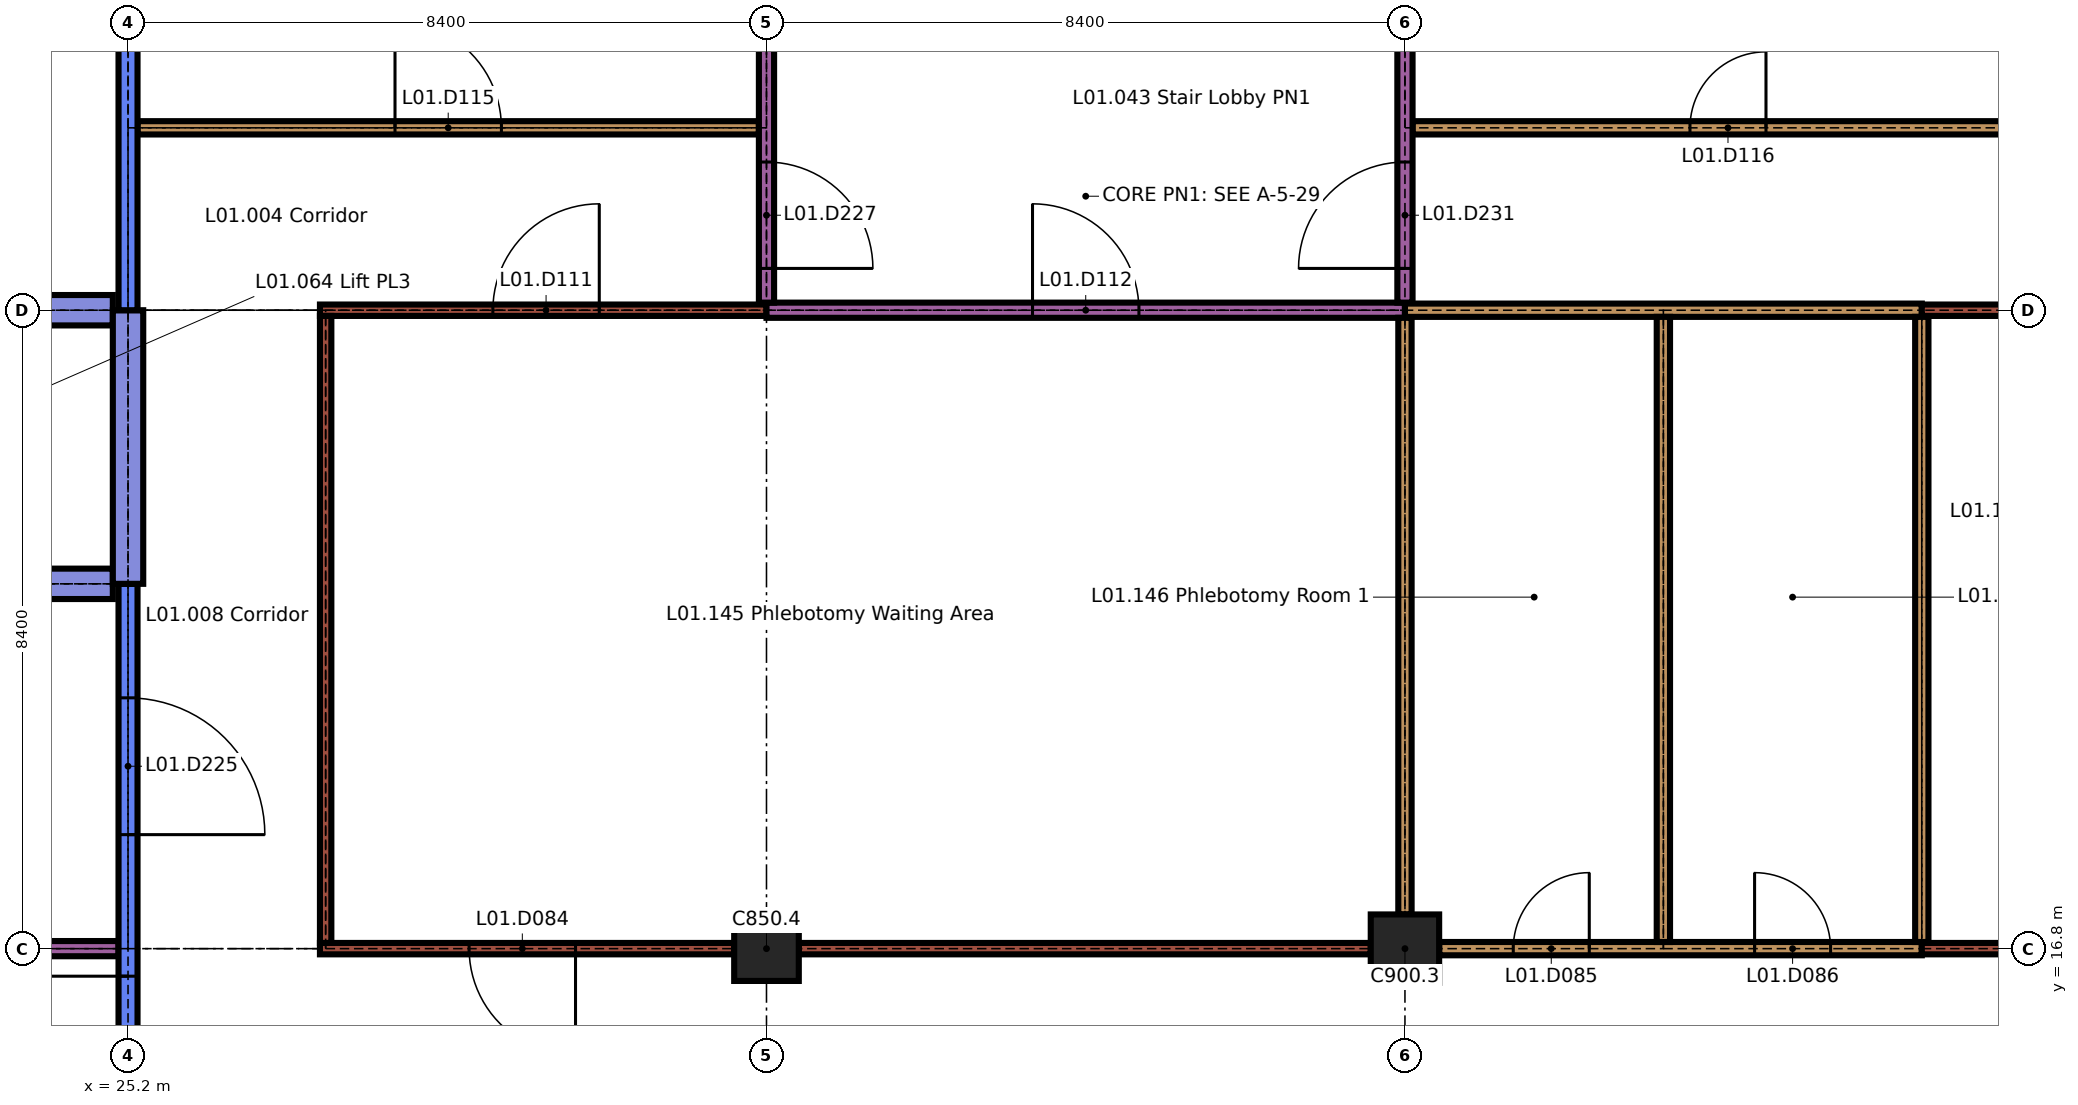
"""IFC4 building model, lengths in metres.
Left out: names, types, materials, properties, quantities, classifications, styles, units other than length and angle.
Written with IfcOpenShell. Run it as: python <this file> out.ifc"""

import sys

from ifc_helpers import new_model, si_unit, direction, frame, frame_2d, origin, origin_2d, place, context, subcontext, project, spatial, rectangle, extrude, element, fill, save


model = new_model("IFC4")
c1 = context("Model", 3, precision=1e-05, world=origin(), true_north=direction((0.0, 1.0)))
c2 = subcontext(c1, "Body", "Model", "MODEL_VIEW")
j1 = project(units=[si_unit("LENGTHUNIT", "METRE"), si_unit("PLANEANGLEUNIT", "RADIAN")], contexts=[c1])
p1 = place(None, origin())
s1 = spatial("IfcSite", under=j1, at=p1, CompositionType="ELEMENT")
p2 = place(p1, origin())
s2 = spatial("IfcBuilding", under=s1, at=p2, CompositionType="ELEMENT")
p3 = place(p2, frame((0.0, 0.0, 4.5)))
s3 = spatial("IfcBuildingStorey", under=s2, at=p3, CompositionType="ELEMENT", Elevation=4.5)
p4 = place(p3, frame((33.6, 16.8, 0.0), z_axis=(0.0, 0.0, 1.0), x_axis=(1.0, 0.0, 0.0)))
e1 = element("IfcColumn", 1, at=p4, inside=s3, PredefinedType="COLUMN", context=c2, shape_type="SweptSolid", body=[
    extrude(rectangle(XDim=0.85, YDim=0.85, at=origin_2d()), origin(), (0.0, 0.0, 1.0), 3.45),
])
p5 = place(p3, frame((42.0, 16.8, 0.0), z_axis=(0.0, 0.0, 1.0), x_axis=(1.0, 0.0, 0.0)))
e2 = element("IfcColumn", 2, at=p5, inside=s3, PredefinedType="COLUMN", context=c2, shape_type="SweptSolid", body=[
    extrude(rectangle(XDim=0.9, YDim=0.9, at=origin_2d()), origin(), (0.0, 0.0, 1.0), 3.45),
])
p6 = place(p3, frame((16.7, 16.8, 0.0), z_axis=(0.0, 0.0, 1.0), x_axis=(1.0, 0.0, 0.0)))
e3 = element("IfcWall", 3, at=p6, inside=s3, PredefinedType="PARTITIONING", context=c2, shape_type="SweptSolid", body=[
    extrude(rectangle(XDim=8.375, YDim=0.2, at=frame_2d((4.188, 0.0))), origin(), (0.0, 0.0, 1.0), 3.45),
])
p7 = place(p6, frame((3.337, 0.0, 0.0)))
e4 = element("IfcOpeningElement", 4, at=p7, cuts=e3, PredefinedType="OPENING", context=c2, shape_type="SweptSolid", body=[
    extrude(rectangle(XDim=1.8, YDim=2.4, at=frame_2d((0.9, 1.2))), frame((0.0, 0.11, 0.0), z_axis=(0.0, -1.0, 0.0), x_axis=(1.0, 0.0, 0.0)), (0.0, 0.0, 1.0), 0.22),
])
p8 = place(p3, frame((27.725, 16.8, 0.0), z_axis=(0.0, 0.0, 1.0), x_axis=(1.0, 0.0, 0.0)))
e5 = element("IfcWall", 5, at=p8, inside=s3, PredefinedType="PARTITIONING", context=c2, shape_type="SweptSolid", body=[
    extrude(rectangle(XDim=5.45, YDim=0.15, at=frame_2d((2.725, 0.0))), origin(), (0.0, 0.0, 1.0), 3.45),
])
p9 = place(p8, frame((1.962, 0.0, 0.0)))
e6 = element("IfcOpeningElement", 6, at=p9, cuts=e5, PredefinedType="OPENING", context=c2, shape_type="SweptSolid", body=[
    extrude(rectangle(XDim=1.4, YDim=2.1, at=frame_2d((0.7, 1.05))), frame((0.0, 0.085, 0.0), z_axis=(0.0, -1.0, 0.0), x_axis=(1.0, 0.0, 0.0)), (0.0, 0.0, 1.0), 0.17),
])
p10 = place(p3, frame((34.025, 16.8, 0.0), z_axis=(0.0, 0.0, 1.0), x_axis=(1.0, 0.0, 0.0)))
e7 = element("IfcWall", 7, at=p10, inside=s3, PredefinedType="PARTITIONING", context=c2, shape_type="SweptSolid", body=[
    extrude(rectangle(XDim=7.525, YDim=0.15, at=frame_2d((3.763, 0.0))), origin(), (0.0, 0.0, 1.0), 3.45),
])
p11 = place(p3, frame((42.45, 16.8, 0.0), z_axis=(0.0, 0.0, 1.0), x_axis=(1.0, 0.0, 0.0)))
e8 = element("IfcWall", 8, at=p11, inside=s3, PredefinedType="PARTITIONING", context=c2, shape_type="SweptSolid", body=[
    extrude(rectangle(XDim=6.35, YDim=0.175, at=frame_2d((3.175, 0.0))), origin(), (0.0, 0.0, 1.0), 3.45),
])
p12 = place(p11, frame((0.975, 0.0, 0.0)))
e9 = element("IfcOpeningElement", 9, at=p12, cuts=e8, PredefinedType="OPENING", context=c2, shape_type="SweptSolid", body=[
    extrude(rectangle(XDim=1.0, YDim=2.1, at=frame_2d((0.5, 1.05))), frame((0.0, 0.097, 0.0), z_axis=(0.0, -1.0, 0.0), x_axis=(1.0, 0.0, 0.0)), (0.0, 0.0, 1.0), 0.195),
])
p13 = place(p11, frame((4.15, 0.0, 0.0)))
e10 = element("IfcOpeningElement", 10, at=p13, cuts=e8, PredefinedType="OPENING", context=c2, shape_type="SweptSolid", body=[
    extrude(rectangle(XDim=1.0, YDim=2.1, at=frame_2d((0.5, 1.05))), frame((0.0, 0.097, 0.0), z_axis=(0.0, -1.0, 0.0), x_axis=(1.0, 0.0, 0.0)), (0.0, 0.0, 1.0), 0.195),
])
p14 = place(p3, frame((48.8, 16.8, 0.0), z_axis=(0.0, 0.0, 1.0), x_axis=(1.0, 0.0, 0.0)))
e11 = element("IfcWall", 11, at=p14, inside=s3, PredefinedType="PARTITIONING", context=c2, shape_type="SweptSolid", body=[
    extrude(rectangle(XDim=1.15, YDim=0.15, at=frame_2d((0.575, 0.0))), origin(), (0.0, 0.0, 1.0), 3.45),
])
p15 = place(p3, frame((17.0, 21.6, 0.0), z_axis=(0.0, 0.0, 1.0), x_axis=(1.0, 0.0, 0.0)))
e12 = element("IfcWall", 12, at=p15, inside=s3, PredefinedType="SHEAR", context=c2, shape_type="SweptSolid", body=[
    extrude(rectangle(XDim=8.0, YDim=0.4, at=frame_2d((4.0, 0.0))), origin(), (0.0, 0.0, 1.0), 3.45),
])
p16 = place(p15, frame((1.3, 0.0, 0.0)))
e13 = element("IfcOpeningElement", 13, at=p16, cuts=e12, PredefinedType="OPENING", context=c2, shape_type="SweptSolid", body=[
    extrude(rectangle(XDim=1.4, YDim=2.1, at=frame_2d((0.7, 1.05))), frame((0.0, 0.21, 0.0), z_axis=(0.0, -1.0, 0.0), x_axis=(1.0, 0.0, 0.0)), (0.0, 0.0, 1.0), 0.42),
])
p17 = place(p15, frame((5.45, 0.0, 0.0)))
e14 = element("IfcOpeningElement", 14, at=p17, cuts=e12, PredefinedType="OPENING", context=c2, shape_type="SweptSolid", body=[
    extrude(rectangle(XDim=1.1, YDim=2.1, at=frame_2d((0.55, 1.05))), frame((0.0, 0.21, 0.0), z_axis=(0.0, -1.0, 0.0), x_axis=(1.0, 0.0, 0.0)), (0.0, 0.0, 1.0), 0.42),
])
p18 = place(p3, frame((17.0, 25.2, 0.0), z_axis=(0.0, 0.0, 1.0), x_axis=(1.0, 0.0, 0.0)))
e15 = element("IfcWall", 15, at=p18, inside=s3, PredefinedType="SHEAR", context=c2, shape_type="SweptSolid", body=[
    extrude(rectangle(XDim=8.0, YDim=0.4, at=frame_2d((4.0, 0.0))), origin(), (0.0, 0.0, 1.0), 3.45),
])
p19 = place(p3, frame((27.725, 25.2, 0.0), z_axis=(0.0, 0.0, 1.0), x_axis=(1.0, 0.0, 0.0)))
e16 = element("IfcWall", 16, at=p19, inside=s3, PredefinedType="PARTITIONING", context=c2, shape_type="SweptSolid", body=[
    extrude(rectangle(XDim=5.875, YDim=0.15, at=frame_2d((2.938, 0.0))), origin(), (0.0, 0.0, 1.0), 3.45),
])
p20 = place(p19, frame((2.275, 0.0, 0.0)))
e17 = element("IfcOpeningElement", 17, at=p20, cuts=e16, PredefinedType="OPENING", context=c2, shape_type="SweptSolid", body=[
    extrude(rectangle(XDim=1.4, YDim=2.1, at=frame_2d((0.7, 1.05))), frame((0.0, 0.085, 0.0), z_axis=(0.0, -1.0, 0.0), x_axis=(1.0, 0.0, 0.0)), (0.0, 0.0, 1.0), 0.17),
])
p21 = place(p3, frame((33.6, 25.2, 0.0), z_axis=(0.0, 0.0, 1.0), x_axis=(1.0, 0.0, 0.0)))
e18 = element("IfcWall", 18, at=p21, inside=s3, PredefinedType="PARTITIONING", context=c2, shape_type="SweptSolid", body=[
    extrude(rectangle(XDim=8.4, YDim=0.2, at=frame_2d((4.2, 0.0))), origin(), (0.0, 0.0, 1.0), 3.45),
])
p22 = place(p21, frame((3.5, 0.0, 0.0)))
e19 = element("IfcOpeningElement", 19, at=p22, cuts=e18, PredefinedType="OPENING", context=c2, shape_type="SweptSolid", body=[
    extrude(rectangle(XDim=1.4, YDim=2.1, at=frame_2d((0.7, 1.05))), frame((0.0, 0.11, 0.0), z_axis=(0.0, -1.0, 0.0), x_axis=(1.0, 0.0, 0.0)), (0.0, 0.0, 1.0), 0.22),
])
p23 = place(p3, frame((42.0, 25.2, 0.0), z_axis=(0.0, 0.0, 1.0), x_axis=(1.0, 0.0, 0.0)))
e20 = element("IfcWall", 20, at=p23, inside=s3, PredefinedType="PARTITIONING", context=c2, shape_type="SweptSolid", body=[
    extrude(rectangle(XDim=6.8, YDim=0.175, at=frame_2d((3.4, 0.0))), origin(), (0.0, 0.0, 1.0), 3.45),
])
p24 = place(p3, frame((48.8, 25.2, 0.0), z_axis=(0.0, 0.0, 1.0), x_axis=(1.0, 0.0, 0.0)))
e21 = element("IfcWall", 21, at=p24, inside=s3, PredefinedType="PARTITIONING", context=c2, shape_type="SweptSolid", body=[
    extrude(rectangle(XDim=1.15, YDim=0.15, at=frame_2d((0.575, 0.0))), origin(), (0.0, 0.0, 1.0), 3.45),
])
p25 = place(p3, frame((25.325, 27.6, 0.0), z_axis=(0.0, 0.0, 1.0), x_axis=(1.0, 0.0, 0.0)))
e22 = element("IfcWall", 22, at=p25, inside=s3, PredefinedType="PARTITIONING", context=c2, shape_type="SweptSolid", body=[
    extrude(rectangle(XDim=8.175, YDim=0.175, at=frame_2d((4.087, 0.0))), origin(), (0.0, 0.0, 1.0), 3.45),
])
p26 = place(p25, frame((3.387, 0.0, 0.0)))
e23 = element("IfcOpeningElement", 23, at=p26, cuts=e22, PredefinedType="OPENING", context=c2, shape_type="SweptSolid", body=[
    extrude(rectangle(XDim=1.4, YDim=2.1, at=frame_2d((0.7, 1.05))), frame((0.0, 0.097, 0.0), z_axis=(0.0, -1.0, 0.0), x_axis=(1.0, 0.0, 0.0)), (0.0, 0.0, 1.0), 0.195),
])
p27 = place(p3, frame((42.1, 27.6, 0.0), z_axis=(0.0, 0.0, 1.0), x_axis=(1.0, 0.0, 0.0)))
e24 = element("IfcWall", 24, at=p27, inside=s3, PredefinedType="PARTITIONING", context=c2, shape_type="SweptSolid", body=[
    extrude(rectangle(XDim=8.3, YDim=0.175, at=frame_2d((4.15, 0.0))), origin(), (0.0, 0.0, 1.0), 3.45),
])
p28 = place(p27, frame((3.65, 0.0, 0.0)))
e25 = element("IfcOpeningElement", 25, at=p28, cuts=e24, PredefinedType="OPENING", context=c2, shape_type="SweptSolid", body=[
    extrude(rectangle(XDim=1.0, YDim=2.1, at=frame_2d((0.5, 1.05))), frame((0.0, 0.097, 0.0), z_axis=(0.0, -1.0, 0.0), x_axis=(1.0, 0.0, 0.0)), (0.0, 0.0, 1.0), 0.195),
])
p29 = place(p3, frame((25.2, 14.275, 0.0), z_axis=(0.0, 0.0, 1.0), x_axis=(0.0, 1.0, 0.0)))
e26 = element("IfcWall", 26, at=p29, inside=s3, PredefinedType="SOLIDWALL", context=c2, shape_type="SweptSolid", body=[
    extrude(rectangle(XDim=7.325, YDim=0.25, at=frame_2d((3.663, 0.0))), origin(), (0.0, 0.0, 1.0), 3.45),
])
p30 = place(p29, frame((0.363, 0.0, 0.0)))
e27 = element("IfcOpeningElement", 27, at=p30, cuts=e26, PredefinedType="OPENING", context=c2, shape_type="SweptSolid", body=[
    extrude(rectangle(XDim=1.8, YDim=2.4, at=frame_2d((0.9, 1.2))), frame((0.0, 0.135, 0.0), z_axis=(0.0, -1.0, 0.0), x_axis=(1.0, 0.0, 0.0)), (0.0, 0.0, 1.0), 0.27),
])
p31 = place(p29, frame((4.025, 0.0, 0.0)))
e28 = element("IfcOpeningElement", 28, at=p31, cuts=e26, PredefinedType="OPENING", context=c2, shape_type="SweptSolid", body=[
    extrude(rectangle(XDim=1.8, YDim=2.4, at=frame_2d((0.9, 1.2))), frame((0.0, 0.135, 0.0), z_axis=(0.0, -1.0, 0.0), x_axis=(1.0, 0.0, 0.0)), (0.0, 0.0, 1.0), 0.27),
])
p32 = place(p3, frame((25.2, 21.6, 0.0), z_axis=(0.0, 0.0, 1.0), x_axis=(0.0, 1.0, 0.0)))
e29 = element("IfcWall", 29, at=p32, inside=s3, PredefinedType="SHEAR", context=c2, shape_type="SweptSolid", body=[
    extrude(rectangle(XDim=3.6, YDim=0.4, at=frame_2d((1.8, 0.0))), origin(), (0.0, 0.0, 1.0), 3.45),
])
p33 = place(p3, frame((25.2, 25.2, 0.0), z_axis=(0.0, 0.0, 1.0), x_axis=(0.0, 1.0, 0.0)))
e30 = element("IfcWall", 30, at=p33, inside=s3, PredefinedType="SOLIDWALL", context=c2, shape_type="SweptSolid", body=[
    extrude(rectangle(XDim=7.975, YDim=0.25, at=frame_2d((3.988, 0.0))), origin(), (0.0, 0.0, 1.0), 3.45),
])
p34 = place(p3, frame((27.8, 16.875, 0.0), z_axis=(0.0, 0.0, 1.0), x_axis=(0.0, 1.0, 0.0)))
e31 = element("IfcWall", 31, at=p34, inside=s3, PredefinedType="PARTITIONING", context=c2, shape_type="SweptSolid", body=[
    extrude(rectangle(XDim=8.25, YDim=0.15, at=frame_2d((4.125, 0.0))), origin(), (0.0, 0.0, 1.0), 3.45),
])
p35 = place(p3, frame((33.6, 25.3, 0.0), z_axis=(0.0, 0.0, 1.0), x_axis=(0.0, 1.0, 0.0)))
e32 = element("IfcWall", 32, at=p35, inside=s3, PredefinedType="PARTITIONING", context=c2, shape_type="SweptSolid", body=[
    extrude(rectangle(XDim=4.7, YDim=0.2, at=frame_2d((2.35, 0.0))), origin(), (0.0, 0.0, 1.0), 3.45),
])
p36 = place(p35, frame((0.45, 0.0, 0.0)))
e33 = element("IfcOpeningElement", 33, at=p36, cuts=e32, PredefinedType="OPENING", context=c2, shape_type="SweptSolid", body=[
    extrude(rectangle(XDim=1.4, YDim=2.1, at=frame_2d((0.7, 1.05))), frame((0.0, 0.11, 0.0), z_axis=(0.0, -1.0, 0.0), x_axis=(1.0, 0.0, 0.0)), (0.0, 0.0, 1.0), 0.22),
])
p37 = place(p3, frame((42.0, 17.25, 0.0), z_axis=(0.0, 0.0, 1.0), x_axis=(0.0, 1.0, 0.0)))
e34 = element("IfcWall", 34, at=p37, inside=s3, PredefinedType="PARTITIONING", context=c2, shape_type="SweptSolid", body=[
    extrude(rectangle(XDim=7.85, YDim=0.175, at=frame_2d((3.925, 0.0))), origin(), (0.0, 0.0, 1.0), 3.45),
])
p38 = place(p3, frame((42.0, 25.3, 0.0), z_axis=(0.0, 0.0, 1.0), x_axis=(0.0, 1.0, 0.0)))
e35 = element("IfcWall", 35, at=p38, inside=s3, PredefinedType="PARTITIONING", context=c2, shape_type="SweptSolid", body=[
    extrude(rectangle(XDim=4.7, YDim=0.2, at=frame_2d((2.35, 0.0))), origin(), (0.0, 0.0, 1.0), 3.45),
])
p39 = place(p38, frame((0.45, 0.0, 0.0)))
e36 = element("IfcOpeningElement", 36, at=p39, cuts=e35, PredefinedType="OPENING", context=c2, shape_type="SweptSolid", body=[
    extrude(rectangle(XDim=1.4, YDim=2.1, at=frame_2d((0.7, 1.05))), frame((0.0, 0.11, 0.0), z_axis=(0.0, -1.0, 0.0), x_axis=(1.0, 0.0, 0.0)), (0.0, 0.0, 1.0), 0.22),
])
for number, where, z_axis, x_axis in (
    (37, (45.4, 16.887, 0.0), (0.0, 0.0, 1.0), (0.0, 1.0, 0.0)),
    (38, (48.8, 16.887, 0.0), (0.0, 0.0, 1.0), (0.0, 1.0, 0.0)),
):
    element("IfcWall", number, at=place(p3, frame(where, z_axis=z_axis, x_axis=x_axis)), inside=s3, PredefinedType="PARTITIONING", context=c2, shape_type="SweptSolid", body=[
        extrude(rectangle(XDim=8.225, YDim=0.175, at=frame_2d((4.113, 0.0))), origin(), (0.0, 0.0, 1.0), 3.45),
    ])
p40 = place(p9, origin())
e39 = element("IfcDoor", 39, at=p40, inside=s3, OperationType="SINGLE_SWING_RIGHT", PredefinedType="DOOR", context=c2, shape_type="SweptSolid", body=[
    extrude(rectangle(XDim=1.4, YDim=2.1, at=frame_2d((0.7, 1.05))), frame((0.0, 0.025, 0.0), z_axis=(0.0, -1.0, 0.0), x_axis=(1.0, 0.0, 0.0)), (0.0, 0.0, 1.0), 0.05),
])
fill(e6, e39)
p41 = place(p12, origin())
e40 = element("IfcDoor", 40, at=p41, inside=s3, OperationType="SINGLE_SWING_LEFT", PredefinedType="DOOR", context=c2, shape_type="SweptSolid", body=[
    extrude(rectangle(XDim=1.0, YDim=2.1, at=frame_2d((0.5, 1.05))), frame((0.0, 0.035, 0.0), z_axis=(0.0, -1.0, 0.0), x_axis=(1.0, 0.0, 0.0)), (0.0, 0.0, 1.0), 0.07),
])
fill(e9, e40)
p42 = place(p13, origin())
e41 = element("IfcDoor", 41, at=p42, inside=s3, OperationType="SINGLE_SWING_RIGHT", PredefinedType="DOOR", context=c2, shape_type="SweptSolid", body=[
    extrude(rectangle(XDim=1.0, YDim=2.1, at=frame_2d((0.5, 1.05))), frame((0.0, 0.035, 0.0), z_axis=(0.0, -1.0, 0.0), x_axis=(1.0, 0.0, 0.0)), (0.0, 0.0, 1.0), 0.07),
])
fill(e10, e41)
p43 = place(p20, origin())
e42 = element("IfcDoor", 42, at=p43, inside=s3, OperationType="SINGLE_SWING_LEFT", PredefinedType="DOOR", context=c2, shape_type="SweptSolid", body=[
    extrude(rectangle(XDim=1.4, YDim=2.1, at=frame_2d((0.7, 1.05))), frame((0.0, 0.025, 0.0), z_axis=(0.0, -1.0, 0.0), x_axis=(1.0, 0.0, 0.0)), (0.0, 0.0, 1.0), 0.05),
])
fill(e17, e42)
p44 = place(p22, origin())
e43 = element("IfcDoor", 43, at=p44, inside=s3, OperationType="SINGLE_SWING_RIGHT", PredefinedType="DOOR", context=c2, shape_type="SweptSolid", body=[
    extrude(rectangle(XDim=1.4, YDim=2.1, at=frame_2d((0.7, 1.05))), frame((0.0, 0.025, 0.0), z_axis=(0.0, -1.0, 0.0), x_axis=(1.0, 0.0, 0.0)), (0.0, 0.0, 1.0), 0.05),
])
fill(e19, e43)
p45 = place(p26, origin())
e44 = element("IfcDoor", 44, at=p45, inside=s3, OperationType="SINGLE_SWING_RIGHT", PredefinedType="DOOR", context=c2, shape_type="SweptSolid", body=[
    extrude(rectangle(XDim=1.4, YDim=2.1, at=frame_2d((0.7, 1.05))), frame((0.0, 0.025, 0.0), z_axis=(0.0, -1.0, 0.0), x_axis=(1.0, 0.0, 0.0)), (0.0, 0.0, 1.0), 0.05),
])
fill(e23, e44)
p46 = place(p28, origin())
e45 = element("IfcDoor", 45, at=p46, inside=s3, OperationType="SINGLE_SWING_LEFT", PredefinedType="DOOR", context=c2, shape_type="SweptSolid", body=[
    extrude(rectangle(XDim=1.0, YDim=2.1, at=frame_2d((0.5, 1.05))), frame((0.0, 0.035, 0.0), z_axis=(0.0, -1.0, 0.0), x_axis=(1.0, 0.0, 0.0)), (0.0, 0.0, 1.0), 0.07),
])
fill(e25, e45)
p47 = place(p30, origin())
e46 = element("IfcDoor", 46, at=p47, inside=s3, OperationType="SINGLE_SWING_LEFT", PredefinedType="DOOR", context=c2, shape_type="SweptSolid", body=[
    extrude(rectangle(XDim=1.8, YDim=2.4, at=frame_2d((0.9, 1.2))), frame((0.0, 0.03, 0.0), z_axis=(0.0, -1.0, 0.0), x_axis=(1.0, 0.0, 0.0)), (0.0, 0.0, 1.0), 0.06),
])
fill(e27, e46)
p48 = place(p31, origin())
e47 = element("IfcDoor", 47, at=p48, inside=s3, OperationType="SINGLE_SWING_LEFT", PredefinedType="DOOR", context=c2, shape_type="SweptSolid", body=[
    extrude(rectangle(XDim=1.8, YDim=2.4, at=frame_2d((0.9, 1.2))), frame((0.0, 0.03, 0.0), z_axis=(0.0, -1.0, 0.0), x_axis=(1.0, 0.0, 0.0)), (0.0, 0.0, 1.0), 0.06),
])
fill(e28, e47)
p49 = place(p36, origin())
e48 = element("IfcDoor", 48, at=p49, inside=s3, OperationType="SINGLE_SWING_LEFT", PredefinedType="DOOR", context=c2, shape_type="SweptSolid", body=[
    extrude(rectangle(XDim=1.4, YDim=2.1, at=frame_2d((0.7, 1.05))), frame((0.0, 0.03, 0.0), z_axis=(0.0, -1.0, 0.0), x_axis=(1.0, 0.0, 0.0)), (0.0, 0.0, 1.0), 0.06),
])
fill(e33, e48)
p50 = place(p39, origin())
e49 = element("IfcDoor", 49, at=p50, inside=s3, OperationType="SINGLE_SWING_RIGHT", PredefinedType="DOOR", context=c2, shape_type="SweptSolid", body=[
    extrude(rectangle(XDim=1.4, YDim=2.1, at=frame_2d((0.7, 1.05))), frame((0.0, 0.03, 0.0), z_axis=(0.0, -1.0, 0.0), x_axis=(1.0, 0.0, 0.0)), (0.0, 0.0, 1.0), 0.06),
])
fill(e36, e49)
save(model, sys.argv[1])
